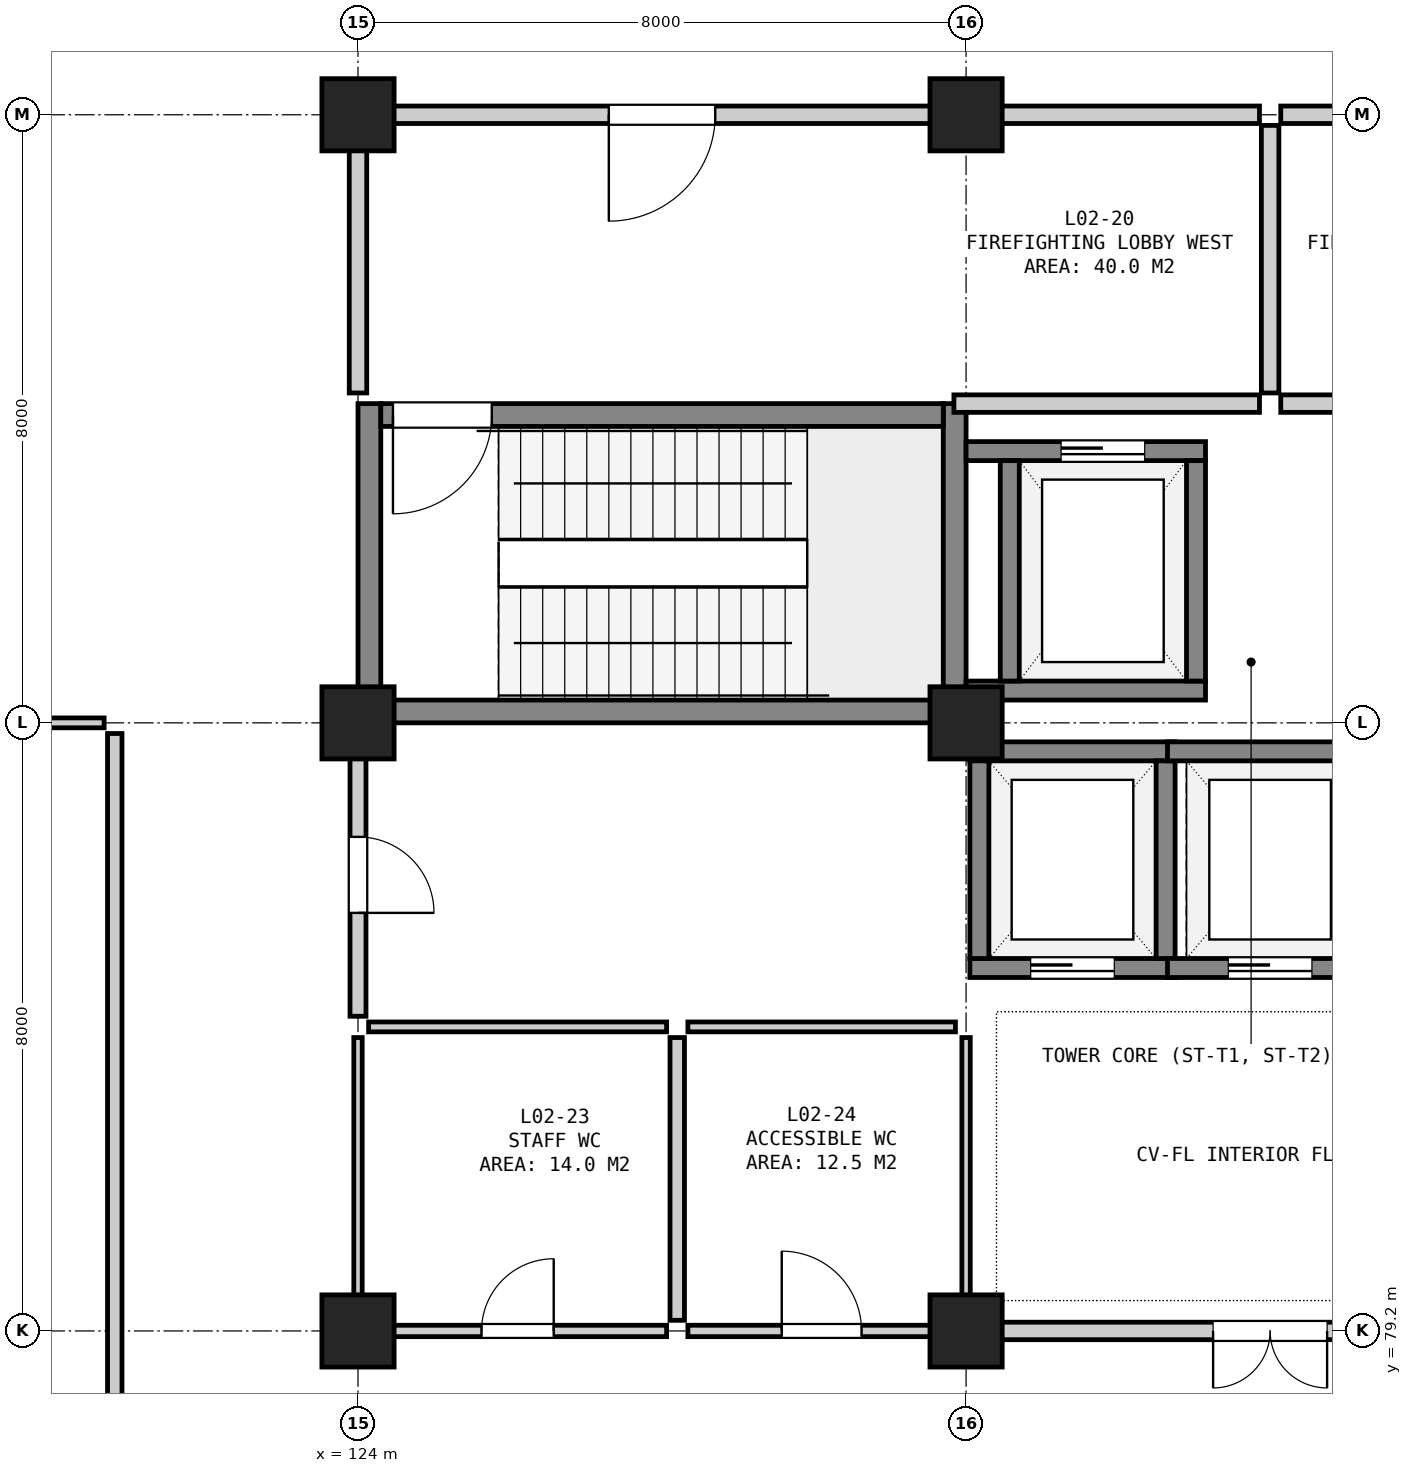
"""IFC4 building model, lengths in metres.
Left out: names, types, materials, properties, quantities, classifications, styles, units other than length and angle.
Written with IfcOpenShell. Run it as: python <this file> out.ifc"""

import sys

from ifc_helpers import new_model, si_unit, direction, frame, frame_2d, origin, origin_2d, place, context, subcontext, project, spatial, rectangle, extrude, element, fill, save


model = new_model("IFC4")
c1 = context("Model", 3, precision=1e-05, world=origin(), true_north=direction((0.0, 1.0)))
c2 = subcontext(c1, "Body", "Model", "MODEL_VIEW")
j1 = project(units=[si_unit("LENGTHUNIT", "METRE"), si_unit("PLANEANGLEUNIT", "RADIAN")], contexts=[c1])
p1 = place(None, origin())
s1 = spatial("IfcSite", under=j1, at=p1, CompositionType="ELEMENT")
p2 = place(p1, origin())
s2 = spatial("IfcBuilding", under=s1, at=p2, CompositionType="ELEMENT")
p3 = place(p2, frame((0.0, 0.0, 10.8)))
s3 = spatial("IfcBuildingStorey", under=s2, at=p3, CompositionType="ELEMENT", Elevation=10.8)
for number, where, z_axis, x_axis in (
    (1, (124.0, 79.2, 0.0), (0.0, 0.0, 1.0), (1.0, 0.0, 0.0)),
    (2, (124.0, 87.2, 0.0), (0.0, 0.0, 1.0), (1.0, 0.0, 0.0)),
    (3, (124.0, 95.2, 0.0), (0.0, 0.0, 1.0), (1.0, 0.0, 0.0)),
    (4, (132.0, 79.2, 0.0), (0.0, 0.0, 1.0), (1.0, 0.0, 0.0)),
    (5, (132.0, 87.2, 0.0), (0.0, 0.0, 1.0), (1.0, 0.0, 0.0)),
    (6, (132.0, 95.2, 0.0), (0.0, 0.0, 1.0), (1.0, 0.0, 0.0)),
):
    element("IfcColumn", number, at=place(p3, frame(where, z_axis=z_axis, x_axis=x_axis)), inside=s3, PredefinedType="COLUMN", context=c2, shape_type="SweptSolid", body=[
        extrude(rectangle(XDim=0.95, YDim=0.95, at=origin_2d()), origin(), (0.0, 0.0, 1.0), 4.8),
    ])
for number, where, z_axis, x_axis in (
    (7, (124.15, 87.2, 0.0), (0.0, 0.0, 1.0), (0.0, 1.0, 0.0)),
    (8, (131.85, 87.2, 0.0), (0.0, 0.0, 1.0), (0.0, 1.0, 0.0)),
):
    element("IfcWall", number, at=place(p3, frame(where, z_axis=z_axis, x_axis=x_axis)), inside=s3, PredefinedType="SHEAR", context=c2, shape_type="SweptSolid", body=[
        extrude(rectangle(XDim=4.2, YDim=0.3, at=frame_2d((2.1, 0.0))), origin(), (0.0, 0.0, 1.0), 4.5),
    ])
p4 = place(p3, frame((124.3, 87.35, 0.0), z_axis=(0.0, 0.0, 1.0), x_axis=(1.0, 0.0, 0.0)))
e9 = element("IfcWall", 9, at=p4, inside=s3, PredefinedType="SHEAR", context=c2, shape_type="SweptSolid", body=[
    extrude(rectangle(XDim=7.4, YDim=0.3, at=frame_2d((3.7, 0.0))), origin(), (0.0, 0.0, 1.0), 4.5),
])
p5 = place(p3, frame((124.3, 91.25, 0.0), z_axis=(0.0, 0.0, 1.0), x_axis=(1.0, 0.0, 0.0)))
e10 = element("IfcWall", 10, at=p5, inside=s3, PredefinedType="SHEAR", context=c2, shape_type="SweptSolid", body=[
    extrude(rectangle(XDim=7.4, YDim=0.3, at=frame_2d((3.7, 0.0))), origin(), (0.0, 0.0, 1.0), 4.5),
])
p6 = place(p5, frame((0.16, 0.0, 0.0)))
e11 = element("IfcOpeningElement", 11, at=p6, cuts=e10, PredefinedType="OPENING", context=c2, shape_type="SweptSolid", body=[
    extrude(rectangle(XDim=1.3, YDim=2.18, at=frame_2d((0.65, 1.09))), frame((0.0, 0.162, 0.0), z_axis=(0.0, -1.0, 0.0), x_axis=(1.0, 0.0, 0.0)), (0.0, 0.0, 1.0), 0.324),
])
p7 = place(p3, frame((132.0, 87.625, 0.0), z_axis=(0.0, 0.0, 1.0), x_axis=(1.0, 0.0, 0.0)))
e12 = element("IfcWall", 12, at=p7, inside=s3, PredefinedType="SHEAR", context=c2, shape_type="SweptSolid", body=[
    extrude(rectangle(XDim=3.15, YDim=0.25, at=frame_2d((1.575, 0.0))), origin(), (0.0, 0.0, 1.0), 4.5),
])
p8 = place(p3, frame((132.0, 90.775, 0.0), z_axis=(0.0, 0.0, 1.0), x_axis=(1.0, 0.0, 0.0)))
e13 = element("IfcWall", 13, at=p8, inside=s3, PredefinedType="SHEAR", context=c2, shape_type="SweptSolid", body=[
    extrude(rectangle(XDim=3.15, YDim=0.25, at=frame_2d((1.575, 0.0))), origin(), (0.0, 0.0, 1.0), 4.5),
])
p9 = place(p8, frame((1.25, 0.0, 0.0)))
e14 = element("IfcOpeningElement", 14, at=p9, cuts=e13, PredefinedType="OPENING", context=c2, shape_type="SweptSolid", body=[
    extrude(rectangle(XDim=1.1, YDim=2.15, at=frame_2d((0.55, 1.075))), frame((0.0, 0.137, 0.0), z_axis=(0.0, -1.0, 0.0), x_axis=(1.0, 0.0, 0.0)), (0.0, 0.0, 1.0), 0.274),
])
for number, where, z_axis, x_axis in (
    (15, (132.575, 87.75, 0.0), (0.0, 0.0, 1.0), (0.0, 1.0, 0.0)),
    (16, (135.025, 87.75, 0.0), (0.0, 0.0, 1.0), (0.0, 1.0, 0.0)),
):
    element("IfcWall", number, at=place(p3, frame(where, z_axis=z_axis, x_axis=x_axis)), inside=s3, PredefinedType="SHEAR", context=c2, shape_type="SweptSolid", body=[
        extrude(rectangle(XDim=2.9, YDim=0.25, at=frame_2d((1.45, 0.0))), origin(), (0.0, 0.0, 1.0), 4.5),
    ])
p10 = place(p3, frame((132.05, 83.975, 0.0), z_axis=(0.0, 0.0, 1.0), x_axis=(1.0, 0.0, 0.0)))
e17 = element("IfcWall", 17, at=p10, inside=s3, PredefinedType="SHEAR", context=c2, shape_type="SweptSolid", body=[
    extrude(rectangle(XDim=2.7, YDim=0.25, at=frame_2d((1.35, 0.0))), origin(), (0.0, 0.0, 1.0), 4.5),
])
p11 = place(p10, frame((0.8, 0.0, 0.0)))
e18 = element("IfcOpeningElement", 18, at=p11, cuts=e17, PredefinedType="OPENING", context=c2, shape_type="SweptSolid", body=[
    extrude(rectangle(XDim=1.1, YDim=2.15, at=frame_2d((0.55, 1.075))), frame((0.0, 0.137, 0.0), z_axis=(0.0, -1.0, 0.0), x_axis=(1.0, 0.0, 0.0)), (0.0, 0.0, 1.0), 0.274),
])
p12 = place(p3, frame((132.05, 86.825, 0.0), z_axis=(0.0, 0.0, 1.0), x_axis=(1.0, 0.0, 0.0)))
e19 = element("IfcWall", 19, at=p12, inside=s3, PredefinedType="SHEAR", context=c2, shape_type="SweptSolid", body=[
    extrude(rectangle(XDim=2.7, YDim=0.25, at=frame_2d((1.35, 0.0))), origin(), (0.0, 0.0, 1.0), 4.5),
])
for number, where, z_axis, x_axis in (
    (20, (132.175, 84.1, 0.0), (0.0, 0.0, 1.0), (0.0, 1.0, 0.0)),
    (21, (134.625, 84.1, 0.0), (0.0, 0.0, 1.0), (0.0, 1.0, 0.0)),
):
    element("IfcWall", number, at=place(p3, frame(where, z_axis=z_axis, x_axis=x_axis)), inside=s3, PredefinedType="SHEAR", context=c2, shape_type="SweptSolid", body=[
        extrude(rectangle(XDim=2.6, YDim=0.25, at=frame_2d((1.3, 0.0))), origin(), (0.0, 0.0, 1.0), 4.5),
    ])
p13 = place(p3, frame((134.65, 83.975, 0.0), z_axis=(0.0, 0.0, 1.0), x_axis=(1.0, 0.0, 0.0)))
e22 = element("IfcWall", 22, at=p13, inside=s3, PredefinedType="SHEAR", context=c2, shape_type="SweptSolid", body=[
    extrude(rectangle(XDim=2.7, YDim=0.25, at=frame_2d((1.35, 0.0))), origin(), (0.0, 0.0, 1.0), 4.5),
])
p14 = place(p13, frame((0.8, 0.0, 0.0)))
e23 = element("IfcOpeningElement", 23, at=p14, cuts=e22, PredefinedType="OPENING", context=c2, shape_type="SweptSolid", body=[
    extrude(rectangle(XDim=1.1, YDim=2.15, at=frame_2d((0.55, 1.075))), frame((0.0, 0.137, 0.0), z_axis=(0.0, -1.0, 0.0), x_axis=(1.0, 0.0, 0.0)), (0.0, 0.0, 1.0), 0.274),
])
p15 = place(p3, frame((134.65, 86.825, 0.0), z_axis=(0.0, 0.0, 1.0), x_axis=(1.0, 0.0, 0.0)))
e24 = element("IfcWall", 24, at=p15, inside=s3, PredefinedType="SHEAR", context=c2, shape_type="SweptSolid", body=[
    extrude(rectangle(XDim=2.7, YDim=0.25, at=frame_2d((1.35, 0.0))), origin(), (0.0, 0.0, 1.0), 4.5),
])
p16 = place(p3, frame((131.84, 91.4, 0.0), z_axis=(0.0, 0.0, 1.0), x_axis=(1.0, 0.0, 0.0)))
e25 = element("IfcWall", 25, at=p16, inside=s3, PredefinedType="SOLIDWALL", context=c2, shape_type="SweptSolid", body=[
    extrude(rectangle(XDim=4.02, YDim=0.23, at=frame_2d((2.01, 0.0))), origin(), (0.0, 0.0, 1.0), 4.5),
])
p17 = place(p3, frame((124.14, 95.2, 0.0), z_axis=(0.0, 0.0, 1.0), x_axis=(1.0, 0.0, 0.0)))
e26 = element("IfcWall", 26, at=p17, inside=s3, PredefinedType="SOLIDWALL", context=c2, shape_type="SweptSolid", body=[
    extrude(rectangle(XDim=11.72, YDim=0.23, at=frame_2d((5.86, 0.0))), origin(), (0.0, 0.0, 1.0), 3.645),
])
p18 = place(p17, frame((3.16, 0.0, 0.0)))
e27 = element("IfcOpeningElement", 27, at=p18, cuts=e26, PredefinedType="OPENING", context=c2, shape_type="SweptSolid", body=[
    extrude(rectangle(XDim=1.4, YDim=2.2, at=frame_2d((0.7, 1.1))), frame((0.0, 0.127, 0.0), z_axis=(0.0, -1.0, 0.0), x_axis=(1.0, 0.0, 0.0)), (0.0, 0.0, 1.0), 0.254),
])
p19 = place(p3, frame((124.0, 91.54, 0.0), z_axis=(0.0, 0.0, 1.0), x_axis=(0.0, 1.0, 0.0)))
e28 = element("IfcWall", 28, at=p19, inside=s3, PredefinedType="SOLIDWALL", context=c2, shape_type="SweptSolid", body=[
    extrude(rectangle(XDim=3.52, YDim=0.23, at=frame_2d((1.76, 0.0))), origin(), (0.0, 0.0, 1.0), 3.695),
])
p20 = place(p3, frame((136.0, 91.54, 0.0), z_axis=(0.0, 0.0, 1.0), x_axis=(0.0, 1.0, 0.0)))
e29 = element("IfcWall", 29, at=p20, inside=s3, PredefinedType="SOLIDWALL", context=c2, shape_type="SweptSolid", body=[
    extrude(rectangle(XDim=3.52, YDim=0.23, at=frame_2d((1.76, 0.0))), origin(), (0.0, 0.0, 1.0), 4.5),
])
p21 = place(p3, frame((136.14, 91.4, 0.0), z_axis=(0.0, 0.0, 1.0), x_axis=(1.0, 0.0, 0.0)))
e30 = element("IfcWall", 30, at=p21, inside=s3, PredefinedType="SOLIDWALL", context=c2, shape_type="SweptSolid", body=[
    extrude(rectangle(XDim=4.02, YDim=0.23, at=frame_2d((2.01, 0.0))), origin(), (0.0, 0.0, 1.0), 4.5),
])
p22 = place(p3, frame((136.14, 95.2, 0.0), z_axis=(0.0, 0.0, 1.0), x_axis=(1.0, 0.0, 0.0)))
e31 = element("IfcWall", 31, at=p22, inside=s3, PredefinedType="SOLIDWALL", context=c2, shape_type="SweptSolid", body=[
    extrude(rectangle(XDim=11.72, YDim=0.23, at=frame_2d((5.86, 0.0))), origin(), (0.0, 0.0, 1.0), 3.695),
])
p23 = place(p22, frame((7.16, 0.0, 0.0)))
e32 = element("IfcOpeningElement", 32, at=p23, cuts=e31, PredefinedType="OPENING", context=c2, shape_type="SweptSolid", body=[
    extrude(rectangle(XDim=1.4, YDim=2.2, at=frame_2d((0.7, 1.1))), frame((0.0, 0.127, 0.0), z_axis=(0.0, -1.0, 0.0), x_axis=(1.0, 0.0, 0.0)), (0.0, 0.0, 1.0), 0.254),
])
p24 = place(p3, frame((124.14, 79.2, 0.0), z_axis=(0.0, 0.0, 1.0), x_axis=(1.0, 0.0, 0.0)))
e33 = element("IfcWall", 33, at=p24, inside=s3, PredefinedType="PARTITIONING", context=c2, shape_type="SweptSolid", body=[
    extrude(rectangle(XDim=3.92, YDim=0.15, at=frame_2d((1.96, 0.0))), origin(), (0.0, 0.0, 1.0), 3.945),
])
p25 = place(p24, frame((1.485, 0.0, 0.0)))
e34 = element("IfcOpeningElement", 34, at=p25, cuts=e33, PredefinedType="OPENING", context=c2, shape_type="SweptSolid", body=[
    extrude(rectangle(XDim=0.95, YDim=2.15, at=frame_2d((0.475, 1.075))), frame((0.0, 0.087, 0.0), z_axis=(0.0, -1.0, 0.0), x_axis=(1.0, 0.0, 0.0)), (0.0, 0.0, 1.0), 0.174),
])
p26 = place(p3, frame((124.14, 83.2, 0.0), z_axis=(0.0, 0.0, 1.0), x_axis=(1.0, 0.0, 0.0)))
e35 = element("IfcWall", 35, at=p26, inside=s3, PredefinedType="PARTITIONING", context=c2, shape_type="SweptSolid", body=[
    extrude(rectangle(XDim=3.92, YDim=0.13, at=frame_2d((1.96, 0.0))), origin(), (0.0, 0.0, 1.0), 4.5),
])
p27 = place(p3, frame((124.0, 79.34, 0.0), z_axis=(0.0, 0.0, 1.0), x_axis=(0.0, 1.0, 0.0)))
e36 = element("IfcWall", 36, at=p27, inside=s3, PredefinedType="PARTITIONING", context=c2, shape_type="SweptSolid", body=[
    extrude(rectangle(XDim=3.72, YDim=0.11, at=frame_2d((1.86, 0.0))), origin(), (0.0, 0.0, 1.0), 3.645),
])
p28 = place(p3, frame((128.2, 79.34, 0.0), z_axis=(0.0, 0.0, 1.0), x_axis=(0.0, 1.0, 0.0)))
e37 = element("IfcWall", 37, at=p28, inside=s3, PredefinedType="PARTITIONING", context=c2, shape_type="SweptSolid", body=[
    extrude(rectangle(XDim=3.72, YDim=0.19, at=frame_2d((1.86, 0.0))), origin(), (0.0, 0.0, 1.0), 4.5),
])
p29 = place(p3, frame((128.34, 79.2, 0.0), z_axis=(0.0, 0.0, 1.0), x_axis=(1.0, 0.0, 0.0)))
e38 = element("IfcWall", 38, at=p29, inside=s3, PredefinedType="PARTITIONING", context=c2, shape_type="SweptSolid", body=[
    extrude(rectangle(XDim=3.52, YDim=0.15, at=frame_2d((1.76, 0.0))), origin(), (0.0, 0.0, 1.0), 3.945),
])
p30 = place(p29, frame((1.235, 0.0, 0.0)))
e39 = element("IfcOpeningElement", 39, at=p30, cuts=e38, PredefinedType="OPENING", context=c2, shape_type="SweptSolid", body=[
    extrude(rectangle(XDim=1.05, YDim=2.15, at=frame_2d((0.525, 1.075))), frame((0.0, 0.087, 0.0), z_axis=(0.0, -1.0, 0.0), x_axis=(1.0, 0.0, 0.0)), (0.0, 0.0, 1.0), 0.174),
])
p31 = place(p3, frame((128.34, 83.2, 0.0), z_axis=(0.0, 0.0, 1.0), x_axis=(1.0, 0.0, 0.0)))
e40 = element("IfcWall", 40, at=p31, inside=s3, PredefinedType="PARTITIONING", context=c2, shape_type="SweptSolid", body=[
    extrude(rectangle(XDim=3.52, YDim=0.13, at=frame_2d((1.76, 0.0))), origin(), (0.0, 0.0, 1.0), 4.5),
])
p32 = place(p3, frame((132.0, 79.34, 0.0), z_axis=(0.0, 0.0, 1.0), x_axis=(0.0, 1.0, 0.0)))
e41 = element("IfcWall", 41, at=p32, inside=s3, PredefinedType="PARTITIONING", context=c2, shape_type="SweptSolid", body=[
    extrude(rectangle(XDim=3.72, YDim=0.11, at=frame_2d((1.86, 0.0))), origin(), (0.0, 0.0, 1.0), 3.995),
])
p33 = place(p3, frame((124.0, 83.34, 0.0), z_axis=(0.0, 0.0, 1.0), x_axis=(0.0, 1.0, 0.0)))
e42 = element("IfcWall", 42, at=p33, inside=s3, PredefinedType="SOLIDWALL", context=c2, shape_type="SweptSolid", body=[
    extrude(rectangle(XDim=3.72, YDim=0.21, at=frame_2d((1.86, 0.0))), origin(), (0.0, 0.0, 1.0), 3.645),
])
p34 = place(p33, frame((1.36, 0.0, 0.0)))
e43 = element("IfcOpeningElement", 43, at=p34, cuts=e42, PredefinedType="OPENING", context=c2, shape_type="SweptSolid", body=[
    extrude(rectangle(XDim=1.0, YDim=2.15, at=frame_2d((0.5, 1.075))), frame((0.0, 0.117, 0.0), z_axis=(0.0, -1.0, 0.0), x_axis=(1.0, 0.0, 0.0)), (0.0, 0.0, 1.0), 0.234),
])
p35 = place(p3, frame((132.14, 79.2, 0.0), z_axis=(0.0, 0.0, 1.0), x_axis=(1.0, 0.0, 0.0)))
e44 = element("IfcWall", 44, at=p35, inside=s3, PredefinedType="SOLIDWALL", context=c2, shape_type="SweptSolid", body=[
    extrude(rectangle(XDim=7.72, YDim=0.23, at=frame_2d((3.86, 0.0))), origin(), (0.0, 0.0, 1.0), 3.995),
])
p36 = place(p35, frame((3.11, 0.0, 0.0)))
e45 = element("IfcOpeningElement", 45, at=p36, cuts=e44, PredefinedType="OPENING", context=c2, shape_type="SweptSolid", body=[
    extrude(rectangle(XDim=1.5, YDim=2.2, at=frame_2d((0.75, 1.1))), frame((0.0, 0.127, 0.0), z_axis=(0.0, -1.0, 0.0), x_axis=(1.0, 0.0, 0.0)), (0.0, 0.0, 1.0), 0.254),
])
p37 = place(p3, frame((86.24, 87.2, 0.0), z_axis=(0.0, 0.0, 1.0), x_axis=(1.0, 0.0, 0.0)))
e46 = element("IfcWall", 46, at=p37, inside=s3, PredefinedType="PARTITIONING", context=c2, shape_type="SweptSolid", body=[
    extrude(rectangle(XDim=34.42, YDim=0.13, at=frame_2d((17.21, 0.0))), origin(), (0.0, 0.0, 1.0), 3.345),
])
p38 = place(p3, frame((120.8, 76.14, 0.0), z_axis=(0.0, 0.0, 1.0), x_axis=(0.0, 1.0, 0.0)))
e47 = element("IfcWall", 47, at=p38, inside=s3, PredefinedType="PARTITIONING", context=c2, shape_type="SweptSolid", body=[
    extrude(rectangle(XDim=10.92, YDim=0.19, at=frame_2d((5.46, 0.0))), origin(), (0.0, 0.0, 1.0), 4.5),
])
p39 = place(p6, frame((1.3, 0.0, 0.0), z_axis=(0.0, 0.0, 1.0), x_axis=(-1.0, 0.0, 0.0)))
e48 = element("IfcDoor", 48, at=p39, inside=s3, OperationType="SINGLE_SWING_RIGHT", PredefinedType="DOOR", context=c2, shape_type="SweptSolid", body=[
    extrude(rectangle(XDim=1.3, YDim=2.18, at=frame_2d((0.65, 1.09))), frame((0.0, 0.025, 0.0), z_axis=(0.0, -1.0, 0.0), x_axis=(1.0, 0.0, 0.0)), (0.0, 0.0, 1.0), 0.05),
])
fill(e11, e48)
p40 = place(p9, origin())
e49 = element("IfcDoor", 49, at=p40, inside=s3, OperationType="SLIDING_TO_LEFT", PredefinedType="DOOR", context=c2, shape_type="SweptSolid", body=[
    extrude(rectangle(XDim=1.1, YDim=2.15, at=frame_2d((0.55, 1.075))), frame((0.0, 0.025, 0.0), z_axis=(0.0, -1.0, 0.0), x_axis=(1.0, 0.0, 0.0)), (0.0, 0.0, 1.0), 0.05),
])
fill(e14, e49)
p41 = place(p11, origin())
e50 = element("IfcDoor", 50, at=p41, inside=s3, OperationType="SLIDING_TO_LEFT", PredefinedType="DOOR", context=c2, shape_type="SweptSolid", body=[
    extrude(rectangle(XDim=1.1, YDim=2.15, at=frame_2d((0.55, 1.075))), frame((0.0, 0.025, 0.0), z_axis=(0.0, -1.0, 0.0), x_axis=(1.0, 0.0, 0.0)), (0.0, 0.0, 1.0), 0.05),
])
fill(e18, e50)
p42 = place(p14, origin())
e51 = element("IfcDoor", 51, at=p42, inside=s3, OperationType="SLIDING_TO_LEFT", PredefinedType="DOOR", context=c2, shape_type="SweptSolid", body=[
    extrude(rectangle(XDim=1.1, YDim=2.15, at=frame_2d((0.55, 1.075))), frame((0.0, 0.025, 0.0), z_axis=(0.0, -1.0, 0.0), x_axis=(1.0, 0.0, 0.0)), (0.0, 0.0, 1.0), 0.05),
])
fill(e23, e51)
p43 = place(p18, frame((1.4, 0.0, 0.0), z_axis=(0.0, 0.0, 1.0), x_axis=(-1.0, 0.0, 0.0)))
e52 = element("IfcDoor", 52, at=p43, inside=s3, OperationType="SINGLE_SWING_RIGHT", PredefinedType="DOOR", context=c2, shape_type="SweptSolid", body=[
    extrude(rectangle(XDim=1.4, YDim=2.2, at=frame_2d((0.7, 1.1))), frame((0.0, 0.025, 0.0), z_axis=(0.0, -1.0, 0.0), x_axis=(1.0, 0.0, 0.0)), (0.0, 0.0, 1.0), 0.05),
])
fill(e27, e52)
p44 = place(p25, origin())
e53 = element("IfcDoor", 53, at=p44, inside=s3, OperationType="SINGLE_SWING_RIGHT", PredefinedType="DOOR", context=c2, shape_type="SweptSolid", body=[
    extrude(rectangle(XDim=0.95, YDim=2.15, at=frame_2d((0.475, 1.075))), frame((0.0, 0.025, 0.0), z_axis=(0.0, -1.0, 0.0), x_axis=(1.0, 0.0, 0.0)), (0.0, 0.0, 1.0), 0.05),
])
fill(e34, e53)
p45 = place(p30, origin())
e54 = element("IfcDoor", 54, at=p45, inside=s3, OperationType="SINGLE_SWING_LEFT", PredefinedType="DOOR", context=c2, shape_type="SweptSolid", body=[
    extrude(rectangle(XDim=1.05, YDim=2.15, at=frame_2d((0.525, 1.075))), frame((0.0, 0.025, 0.0), z_axis=(0.0, -1.0, 0.0), x_axis=(1.0, 0.0, 0.0)), (0.0, 0.0, 1.0), 0.05),
])
fill(e39, e54)
p46 = place(p34, frame((1.0, 0.0, 0.0), z_axis=(0.0, 0.0, 1.0), x_axis=(-1.0, 0.0, 0.0)))
e55 = element("IfcDoor", 55, at=p46, inside=s3, OperationType="SINGLE_SWING_RIGHT", PredefinedType="DOOR", context=c2, shape_type="SweptSolid", body=[
    extrude(rectangle(XDim=1.0, YDim=2.15, at=frame_2d((0.5, 1.075))), frame((0.0, 0.025, 0.0), z_axis=(0.0, -1.0, 0.0), x_axis=(1.0, 0.0, 0.0)), (0.0, 0.0, 1.0), 0.05),
])
fill(e43, e55)
p47 = place(p36, frame((1.5, 0.0, 0.0), z_axis=(0.0, 0.0, 1.0), x_axis=(-1.0, 0.0, 0.0)))
e56 = element("IfcDoor", 56, at=p47, inside=s3, OperationType="DOUBLE_DOOR_SINGLE_SWING", PredefinedType="DOOR", context=c2, shape_type="SweptSolid", body=[
    extrude(rectangle(XDim=1.5, YDim=2.2, at=frame_2d((0.75, 1.1))), frame((0.0, 0.025, 0.0), z_axis=(0.0, -1.0, 0.0), x_axis=(1.0, 0.0, 0.0)), (0.0, 0.0, 1.0), 0.05),
])
fill(e45, e56)
save(model, sys.argv[1])
